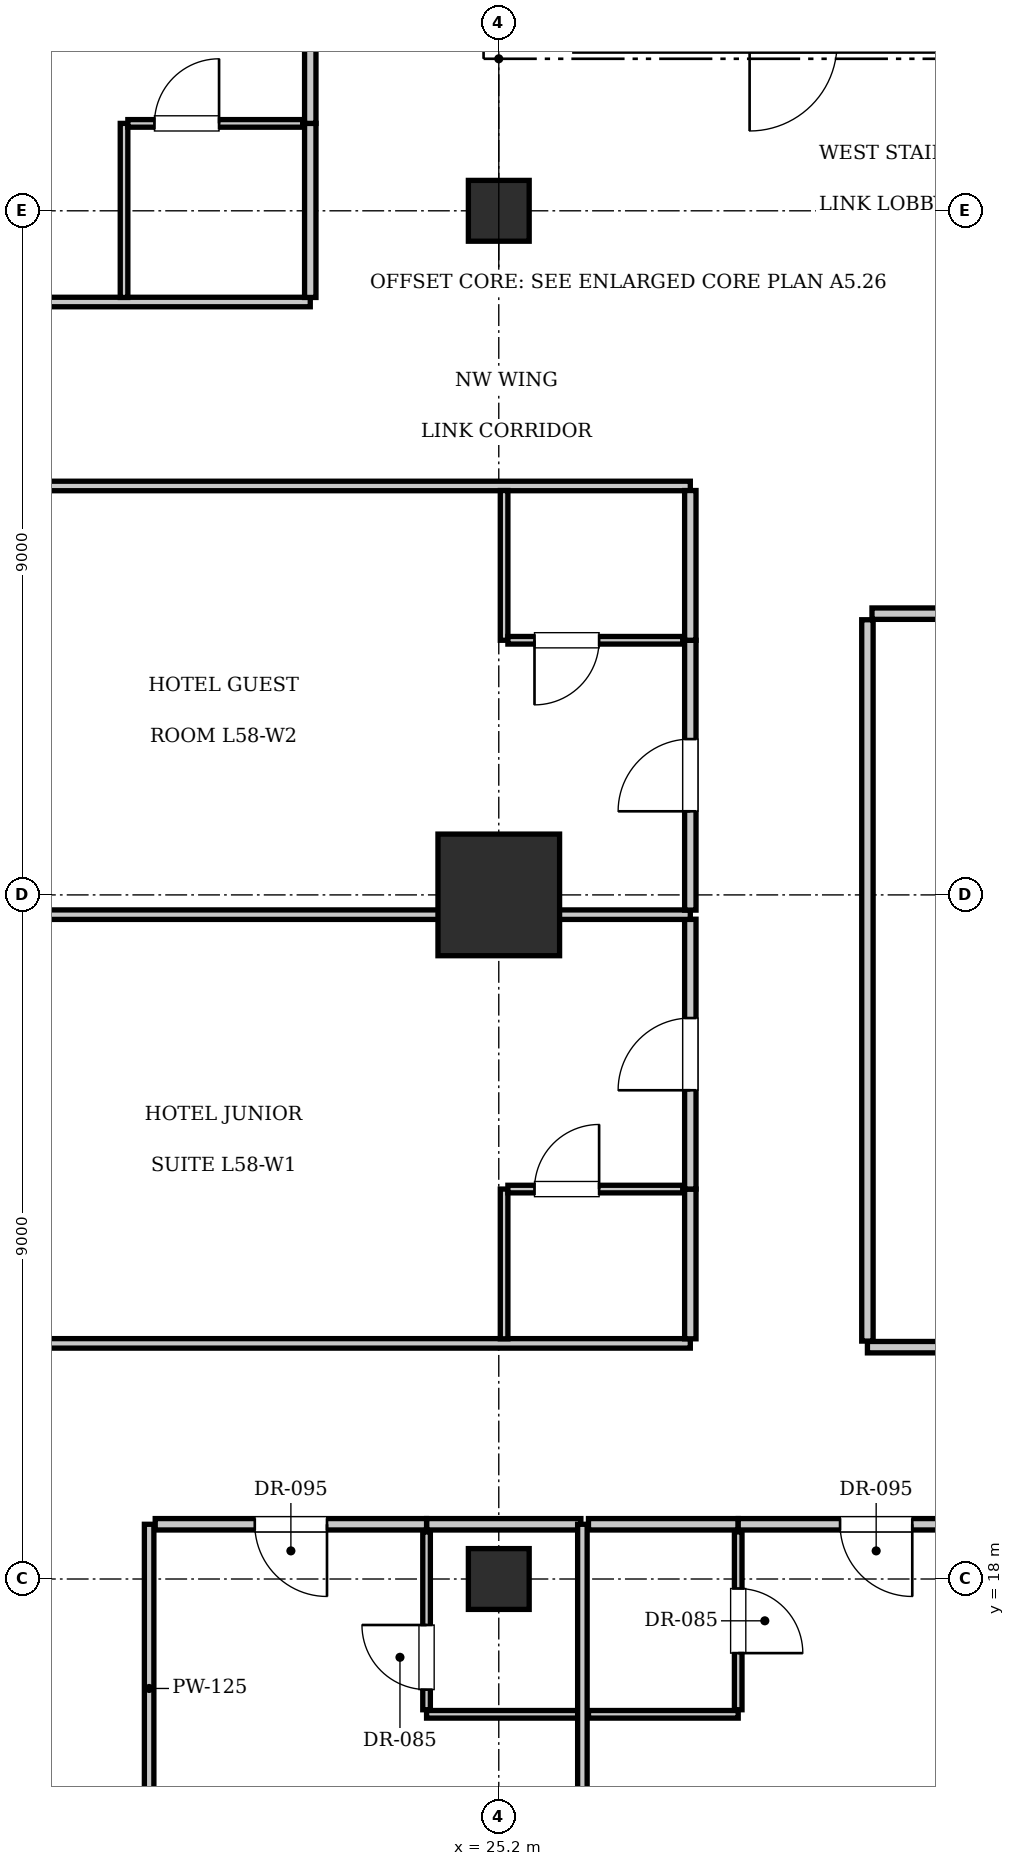
"""IFC4 building model, lengths in metres.
Left out: names, types, materials, properties, quantities, classifications, styles, units other than length and angle.
Written with IfcOpenShell. Run it as: python <this file> out.ifc"""

import sys

from ifc_helpers import new_model, si_unit, direction, frame, frame_2d, origin, origin_2d, place, context, subcontext, project, spatial, rectangle, extrude, element, fill, save


model = new_model("IFC4")
c1 = context("Model", 3, precision=1e-05, world=origin(), true_north=direction((0.0, 1.0)))
c2 = subcontext(c1, "Body", "Model", "MODEL_VIEW")
j1 = project(units=[si_unit("LENGTHUNIT", "METRE"), si_unit("PLANEANGLEUNIT", "RADIAN")], contexts=[c1])
p1 = place(None, origin())
s1 = spatial("IfcSite", under=j1, at=p1, CompositionType="ELEMENT")
p2 = place(p1, origin())
s2 = spatial("IfcBuilding", under=s1, at=p2, CompositionType="ELEMENT")
p3 = place(p2, frame((0.0, 0.0, 239.4)))
s3 = spatial("IfcBuildingStorey", under=s2, at=p3, CompositionType="ELEMENT", Elevation=239.4)
p4 = place(p3, frame((25.2, 27.0, 0.0), z_axis=(0.0, 0.0, 1.0), x_axis=(1.0, 0.0, 0.0)))
e1 = element("IfcColumn", 1, at=p4, inside=s3, PredefinedType="COLUMN", context=c2, shape_type="SweptSolid", body=[
    extrude(rectangle(XDim=1.6, YDim=1.6, at=origin_2d()), origin(), (0.0, 0.0, 1.0), 3.85),
])
for number, where, z_axis, x_axis in (
    (2, (25.2, 36.0, 0.0), (0.0, 0.0, 1.0), (1.0, 0.0, 0.0)),
    (3, (25.2, 18.0, 0.0), (0.0, 0.0, 1.0), (1.0, 0.0, 0.0)),
):
    element("IfcColumn", number, at=place(p3, frame(where, z_axis=z_axis, x_axis=x_axis)), inside=s3, PredefinedType="COLUMN", context=c2, shape_type="SweptSolid", body=[
        extrude(rectangle(XDim=0.8, YDim=0.8, at=origin_2d()), origin(), (0.0, 0.0, 1.0), 3.85),
    ])
p5 = place(p3, frame((30.05, 21.05, 0.0), z_axis=(0.0, 0.0, 1.0), x_axis=(1.0, 0.0, 0.0)))
e4 = element("IfcWall", 4, at=p5, inside=s3, PredefinedType="PARTITIONING", context=c2, shape_type="SweptSolid", body=[
    extrude(rectangle(XDim=15.55, YDim=0.15, at=frame_2d((7.775, 0.0))), origin(), (0.0, 0.0, 1.0), 3.61),
])
p6 = place(p3, frame((30.05, 21.13, 0.0), z_axis=(0.0, 0.0, 1.0), x_axis=(0.0, 1.0, 0.0)))
e5 = element("IfcWall", 5, at=p6, inside=s3, PredefinedType="PARTITIONING", context=c2, shape_type="SweptSolid", body=[
    extrude(rectangle(XDim=9.49, YDim=0.15, at=frame_2d((4.745, 0.0))), origin(), (0.0, 0.0, 1.0), 3.61),
])
p7 = place(p3, frame((30.11, 30.7, 0.0), z_axis=(0.0, 0.0, 1.0), x_axis=(1.0, 0.0, 0.0)))
e6 = element("IfcWall", 6, at=p7, inside=s3, PredefinedType="PARTITIONING", context=c2, shape_type="SweptSolid", body=[
    extrude(rectangle(XDim=5.663, YDim=0.15, at=frame_2d((2.832, 0.0))), origin(), (0.0, 0.0, 1.0), 3.61),
])
p8 = place(p7, frame((2.382, 0.0, 0.0)))
e7 = element("IfcOpeningElement", 7, at=p8, cuts=e6, PredefinedType="OPENING", context=c2, shape_type="SweptSolid", body=[
    extrude(rectangle(XDim=0.9, YDim=2.1, at=frame_2d((0.45, 1.05))), frame((0.0, 0.085, 0.0), z_axis=(0.0, -1.0, 0.0), x_axis=(1.0, 0.0, 0.0)), (0.0, 0.0, 1.0), 0.17),
])
p9 = place(p3, frame((20.6, 14.4, 0.0), z_axis=(0.0, 0.0, 1.0), x_axis=(0.0, 1.0, 0.0)))
e8 = element("IfcWall", 8, at=p9, inside=s3, PredefinedType="PARTITIONING", context=c2, shape_type="SweptSolid", body=[
    extrude(rectangle(XDim=4.32, YDim=0.125, at=frame_2d((2.16, 0.0))), origin(), (0.0, 0.0, 1.0), 3.61),
])
p10 = place(p3, frame((24.25, 18.72, 0.0), z_axis=(0.0, 0.0, 1.0), x_axis=(1.0, 0.0, 0.0)))
e9 = element("IfcWall", 9, at=p10, inside=s3, PredefinedType="PARTITIONING", context=c2, shape_type="SweptSolid", body=[
    extrude(rectangle(XDim=2.03, YDim=0.15, at=frame_2d((1.015, 0.0))), origin(), (0.0, 0.0, 1.0), 3.61),
])
p11 = place(p3, frame((24.25, 16.22, 0.0), z_axis=(0.0, 0.0, 1.0), x_axis=(1.0, 0.0, 0.0)))
e10 = element("IfcWall", 10, at=p11, inside=s3, PredefinedType="PARTITIONING", context=c2, shape_type="SweptSolid", body=[
    extrude(rectangle(XDim=2.01, YDim=0.1, at=frame_2d((1.005, 0.0))), origin(), (0.0, 0.0, 1.0), 3.61),
])
p12 = place(p3, frame((24.25, 16.28, 0.0), z_axis=(0.0, 0.0, 1.0), x_axis=(0.0, 1.0, 0.0)))
e11 = element("IfcWall", 11, at=p12, inside=s3, PredefinedType="PARTITIONING", context=c2, shape_type="SweptSolid", body=[
    extrude(rectangle(XDim=2.34, YDim=0.1, at=frame_2d((1.17, 0.0))), origin(), (0.0, 0.0, 1.0), 3.61),
])
p13 = place(p12, frame((0.265, 0.0, 0.0)))
e12 = element("IfcOpeningElement", 12, at=p13, cuts=e11, PredefinedType="OPENING", context=c2, shape_type="SweptSolid", body=[
    extrude(rectangle(XDim=0.85, YDim=2.1, at=frame_2d((0.425, 1.05))), frame((0.0, 0.06, 0.0), z_axis=(0.0, -1.0, 0.0), x_axis=(1.0, 0.0, 0.0)), (0.0, 0.0, 1.0), 0.12),
])
p14 = place(p3, frame((20.68, 18.72, 0.0), z_axis=(0.0, 0.0, 1.0), x_axis=(1.0, 0.0, 0.0)))
e13 = element("IfcWall", 13, at=p14, inside=s3, PredefinedType="PARTITIONING", context=c2, shape_type="SweptSolid", body=[
    extrude(rectangle(XDim=3.57, YDim=0.15, at=frame_2d((1.785, 0.0))), origin(), (0.0, 0.0, 1.0), 3.61),
])
p15 = place(p14, frame((1.31, 0.0, 0.0)))
e14 = element("IfcOpeningElement", 14, at=p15, cuts=e13, PredefinedType="OPENING", context=c2, shape_type="SweptSolid", body=[
    extrude(rectangle(XDim=0.95, YDim=2.15, at=frame_2d((0.475, 1.075))), frame((0.0, 0.085, 0.0), z_axis=(0.0, -1.0, 0.0), x_axis=(1.0, 0.0, 0.0)), (0.0, 0.0, 1.0), 0.17),
])
p16 = place(p3, frame((26.3, 9.3, 0.0), z_axis=(0.0, 0.0, 1.0), x_axis=(0.0, 1.0, 0.0)))
e15 = element("IfcWall", 15, at=p16, inside=s3, PredefinedType="PARTITIONING", context=c2, shape_type="SweptSolid", body=[
    extrude(rectangle(XDim=9.42, YDim=0.125, at=frame_2d((4.71, 0.0))), origin(), (0.0, 0.0, 1.0), 3.61),
])
p17 = place(p3, frame((26.38, 18.72, 0.0), z_axis=(0.0, 0.0, 1.0), x_axis=(1.0, 0.0, 0.0)))
e16 = element("IfcWall", 16, at=p17, inside=s3, PredefinedType="PARTITIONING", context=c2, shape_type="SweptSolid", body=[
    extrude(rectangle(XDim=1.97, YDim=0.15, at=frame_2d((0.985, 0.0))), origin(), (0.0, 0.0, 1.0), 3.61),
])
p18 = place(p3, frame((26.38, 16.22, 0.0), z_axis=(0.0, 0.0, 1.0), x_axis=(1.0, 0.0, 0.0)))
e17 = element("IfcWall", 17, at=p18, inside=s3, PredefinedType="PARTITIONING", context=c2, shape_type="SweptSolid", body=[
    extrude(rectangle(XDim=1.97, YDim=0.1, at=frame_2d((0.985, 0.0))), origin(), (0.0, 0.0, 1.0), 3.61),
])
p19 = place(p3, frame((28.35, 16.28, 0.0), z_axis=(0.0, 0.0, 1.0), x_axis=(0.0, 1.0, 0.0)))
e18 = element("IfcWall", 18, at=p19, inside=s3, PredefinedType="PARTITIONING", context=c2, shape_type="SweptSolid", body=[
    extrude(rectangle(XDim=2.34, YDim=0.1, at=frame_2d((1.17, 0.0))), origin(), (0.0, 0.0, 1.0), 3.61),
])
p20 = place(p19, frame((0.745, 0.0, 0.0)))
e19 = element("IfcOpeningElement", 19, at=p20, cuts=e18, PredefinedType="OPENING", context=c2, shape_type="SweptSolid", body=[
    extrude(rectangle(XDim=0.85, YDim=2.1, at=frame_2d((0.425, 1.05))), frame((0.0, 0.06, 0.0), z_axis=(0.0, -1.0, 0.0), x_axis=(1.0, 0.0, 0.0)), (0.0, 0.0, 1.0), 0.12),
])
p21 = place(p3, frame((28.35, 18.72, 0.0), z_axis=(0.0, 0.0, 1.0), x_axis=(1.0, 0.0, 0.0)))
e20 = element("IfcWall", 20, at=p21, inside=s3, PredefinedType="PARTITIONING", context=c2, shape_type="SweptSolid", body=[
    extrude(rectangle(XDim=3.63, YDim=0.15, at=frame_2d((1.815, 0.0))), origin(), (0.0, 0.0, 1.0), 3.61),
])
p22 = place(p21, frame((1.34, 0.0, 0.0)))
e21 = element("IfcOpeningElement", 21, at=p22, cuts=e20, PredefinedType="OPENING", context=c2, shape_type="SweptSolid", body=[
    extrude(rectangle(XDim=0.95, YDim=2.15, at=frame_2d((0.475, 1.075))), frame((0.0, 0.085, 0.0), z_axis=(0.0, -1.0, 0.0), x_axis=(1.0, 0.0, 0.0)), (0.0, 0.0, 1.0), 0.17),
])
for number, where, z_axis, x_axis in (
    (22, (15.5, 21.1, 0.0), (0.0, 0.0, 1.0), (1.0, 0.0, 0.0)),
    (23, (15.5, 32.38, 0.0), (0.0, 0.0, 1.0), (1.0, 0.0, 0.0)),
):
    element("IfcWall", number, at=place(p3, frame(where, z_axis=z_axis, x_axis=x_axis)), inside=s3, PredefinedType="PARTITIONING", context=c2, shape_type="SweptSolid", body=[
        extrude(rectangle(XDim=12.22, YDim=0.125, at=frame_2d((6.11, 0.0))), origin(), (0.0, 0.0, 1.0), 3.61),
    ])
p23 = place(p3, frame((27.72, 21.16, 0.0), z_axis=(0.0, 0.0, 1.0), x_axis=(0.0, 1.0, 0.0)))
e24 = element("IfcWall", 24, at=p23, inside=s3, PredefinedType="PARTITIONING", context=c2, shape_type="SweptSolid", body=[
    extrude(rectangle(XDim=1.97, YDim=0.15, at=frame_2d((0.985, 0.0))), origin(), (0.0, 0.0, 1.0), 3.61),
])
p24 = place(p3, frame((27.72, 23.13, 0.0), z_axis=(0.0, 0.0, 1.0), x_axis=(0.0, 1.0, 0.0)))
e25 = element("IfcWall", 25, at=p24, inside=s3, PredefinedType="PARTITIONING", context=c2, shape_type="SweptSolid", body=[
    extrude(rectangle(XDim=3.55, YDim=0.15, at=frame_2d((1.775, 0.0))), origin(), (0.0, 0.0, 1.0), 3.61),
])
p25 = place(p24, frame((1.3, 0.0, 0.0)))
e26 = element("IfcOpeningElement", 26, at=p25, cuts=e25, PredefinedType="OPENING", context=c2, shape_type="SweptSolid", body=[
    extrude(rectangle(XDim=0.95, YDim=2.15, at=frame_2d((0.475, 1.075))), frame((0.0, 0.085, 0.0), z_axis=(0.0, -1.0, 0.0), x_axis=(1.0, 0.0, 0.0)), (0.0, 0.0, 1.0), 0.17),
])
p26 = place(p3, frame((25.27, 21.16, 0.0), z_axis=(0.0, 0.0, 1.0), x_axis=(0.0, 1.0, 0.0)))
e27 = element("IfcWall", 27, at=p26, inside=s3, PredefinedType="PARTITIONING", context=c2, shape_type="SweptSolid", body=[
    extrude(rectangle(XDim=1.97, YDim=0.1, at=frame_2d((0.985, 0.0))), origin(), (0.0, 0.0, 1.0), 3.077),
])
p27 = place(p3, frame((25.32, 23.13, 0.0), z_axis=(0.0, 0.0, 1.0), x_axis=(1.0, 0.0, 0.0)))
e28 = element("IfcWall", 28, at=p27, inside=s3, PredefinedType="PARTITIONING", context=c2, shape_type="SweptSolid", body=[
    extrude(rectangle(XDim=2.3, YDim=0.1, at=frame_2d((1.15, 0.0))), origin(), (0.0, 0.0, 1.0), 3.61),
])
p28 = place(p27, frame((0.35, 0.0, 0.0)))
e29 = element("IfcOpeningElement", 29, at=p28, cuts=e28, PredefinedType="OPENING", context=c2, shape_type="SweptSolid", body=[
    extrude(rectangle(XDim=0.85, YDim=2.1, at=frame_2d((0.425, 1.05))), frame((0.0, 0.06, 0.0), z_axis=(0.0, -1.0, 0.0), x_axis=(1.0, 0.0, 0.0)), (0.0, 0.0, 1.0), 0.12),
])
p29 = place(p3, frame((15.5, 26.74, 0.0), z_axis=(0.0, 0.0, 1.0), x_axis=(1.0, 0.0, 0.0)))
e30 = element("IfcWall", 30, at=p29, inside=s3, PredefinedType="PARTITIONING", context=c2, shape_type="SweptSolid", body=[
    extrude(rectangle(XDim=12.22, YDim=0.125, at=frame_2d((6.11, 0.0))), origin(), (0.0, 0.0, 1.0), 2.41),
])
p30 = place(p3, frame((27.72, 26.8, 0.0), z_axis=(0.0, 0.0, 1.0), x_axis=(0.0, 1.0, 0.0)))
e31 = element("IfcWall", 31, at=p30, inside=s3, PredefinedType="PARTITIONING", context=c2, shape_type="SweptSolid", body=[
    extrude(rectangle(XDim=3.55, YDim=0.15, at=frame_2d((1.775, 0.0))), origin(), (0.0, 0.0, 1.0), 3.61),
])
p31 = place(p30, frame((1.3, 0.0, 0.0)))
e32 = element("IfcOpeningElement", 32, at=p31, cuts=e31, PredefinedType="OPENING", context=c2, shape_type="SweptSolid", body=[
    extrude(rectangle(XDim=0.95, YDim=2.15, at=frame_2d((0.475, 1.075))), frame((0.0, 0.085, 0.0), z_axis=(0.0, -1.0, 0.0), x_axis=(1.0, 0.0, 0.0)), (0.0, 0.0, 1.0), 0.17),
])
p32 = place(p3, frame((27.72, 30.35, 0.0), z_axis=(0.0, 0.0, 1.0), x_axis=(0.0, 1.0, 0.0)))
e33 = element("IfcWall", 33, at=p32, inside=s3, PredefinedType="PARTITIONING", context=c2, shape_type="SweptSolid", body=[
    extrude(rectangle(XDim=1.97, YDim=0.15, at=frame_2d((0.985, 0.0))), origin(), (0.0, 0.0, 1.0), 3.61),
])
p33 = place(p3, frame((25.27, 30.35, 0.0), z_axis=(0.0, 0.0, 1.0), x_axis=(0.0, 1.0, 0.0)))
e34 = element("IfcWall", 34, at=p33, inside=s3, PredefinedType="PARTITIONING", context=c2, shape_type="SweptSolid", body=[
    extrude(rectangle(XDim=1.97, YDim=0.1, at=frame_2d((0.985, 0.0))), origin(), (0.0, 0.0, 1.0), 3.077),
])
p34 = place(p3, frame((25.32, 30.35, 0.0), z_axis=(0.0, 0.0, 1.0), x_axis=(1.0, 0.0, 0.0)))
e35 = element("IfcWall", 35, at=p34, inside=s3, PredefinedType="PARTITIONING", context=c2, shape_type="SweptSolid", body=[
    extrude(rectangle(XDim=2.3, YDim=0.1, at=frame_2d((1.15, 0.0))), origin(), (0.0, 0.0, 1.0), 3.61),
])
p35 = place(p34, frame((0.35, 0.0, 0.0)))
e36 = element("IfcOpeningElement", 36, at=p35, cuts=e35, PredefinedType="OPENING", context=c2, shape_type="SweptSolid", body=[
    extrude(rectangle(XDim=0.85, YDim=2.1, at=frame_2d((0.425, 1.05))), frame((0.0, 0.06, 0.0), z_axis=(0.0, -1.0, 0.0), x_axis=(1.0, 0.0, 0.0)), (0.0, 0.0, 1.0), 0.12),
])
p36 = place(p3, frame((15.5, 34.8, 0.0), z_axis=(0.0, 0.0, 1.0), x_axis=(1.0, 0.0, 0.0)))
e37 = element("IfcWall", 37, at=p36, inside=s3, PredefinedType="PARTITIONING", context=c2, shape_type="SweptSolid", body=[
    extrude(rectangle(XDim=7.22, YDim=0.125, at=frame_2d((3.61, 0.0))), origin(), (0.0, 0.0, 1.0), 3.61),
])
p37 = place(p3, frame((22.72, 34.86, 0.0), z_axis=(0.0, 0.0, 1.0), x_axis=(0.0, 1.0, 0.0)))
e38 = element("IfcWall", 38, at=p37, inside=s3, PredefinedType="PARTITIONING", context=c2, shape_type="SweptSolid", body=[
    extrude(rectangle(XDim=2.29, YDim=0.15, at=frame_2d((1.145, 0.0))), origin(), (0.0, 0.0, 1.0), 3.61),
])
p38 = place(p3, frame((22.72, 37.15, 0.0), z_axis=(0.0, 0.0, 1.0), x_axis=(0.0, 1.0, 0.0)))
e39 = element("IfcWall", 39, at=p38, inside=s3, PredefinedType="PARTITIONING", context=c2, shape_type="SweptSolid", body=[
    extrude(rectangle(XDim=4.559, YDim=0.15, at=frame_2d((2.279, 0.0))), origin(), (0.0, 0.0, 1.0), 3.61),
])
p39 = place(p38, frame((1.804, 0.0, 0.0)))
e40 = element("IfcOpeningElement", 40, at=p39, cuts=e39, PredefinedType="OPENING", context=c2, shape_type="SweptSolid", body=[
    extrude(rectangle(XDim=0.95, YDim=2.15, at=frame_2d((0.475, 1.075))), frame((0.0, 0.085, 0.0), z_axis=(0.0, -1.0, 0.0), x_axis=(1.0, 0.0, 0.0)), (0.0, 0.0, 1.0), 0.17),
])
p40 = place(p3, frame((20.27, 34.86, 0.0), z_axis=(0.0, 0.0, 1.0), x_axis=(0.0, 1.0, 0.0)))
e41 = element("IfcWall", 41, at=p40, inside=s3, PredefinedType="PARTITIONING", context=c2, shape_type="SweptSolid", body=[
    extrude(rectangle(XDim=2.29, YDim=0.1, at=frame_2d((1.145, 0.0))), origin(), (0.0, 0.0, 1.0), 3.61),
])
p41 = place(p3, frame((20.32, 37.15, 0.0), z_axis=(0.0, 0.0, 1.0), x_axis=(1.0, 0.0, 0.0)))
e42 = element("IfcWall", 42, at=p41, inside=s3, PredefinedType="PARTITIONING", context=c2, shape_type="SweptSolid", body=[
    extrude(rectangle(XDim=2.3, YDim=0.1, at=frame_2d((1.15, 0.0))), origin(), (0.0, 0.0, 1.0), 3.61),
])
p42 = place(p41, frame((0.35, 0.0, 0.0)))
e43 = element("IfcOpeningElement", 43, at=p42, cuts=e42, PredefinedType="OPENING", context=c2, shape_type="SweptSolid", body=[
    extrude(rectangle(XDim=0.85, YDim=2.1, at=frame_2d((0.425, 1.05))), frame((0.0, 0.06, 0.0), z_axis=(0.0, -1.0, 0.0), x_axis=(1.0, 0.0, 0.0)), (0.0, 0.0, 1.0), 0.12),
])
p43 = place(p13, origin())
e44 = element("IfcDoor", 44, at=p43, inside=s3, OperationType="SINGLE_SWING_RIGHT", PredefinedType="DOOR", context=c2, shape_type="SweptSolid", body=[
    extrude(rectangle(XDim=0.85, YDim=2.1, at=frame_2d((0.425, 1.05))), frame((0.0, 0.025, 0.0), z_axis=(0.0, -1.0, 0.0), x_axis=(1.0, 0.0, 0.0)), (0.0, 0.0, 1.0), 0.05),
])
fill(e12, e44)
p44 = place(p15, frame((0.95, 0.0, 0.0), z_axis=(0.0, 0.0, 1.0), x_axis=(-1.0, 0.0, 0.0)))
e45 = element("IfcDoor", 45, at=p44, inside=s3, OperationType="SINGLE_SWING_LEFT", PredefinedType="DOOR", context=c2, shape_type="SweptSolid", body=[
    extrude(rectangle(XDim=0.95, YDim=2.15, at=frame_2d((0.475, 1.075))), frame((0.0, 0.025, 0.0), z_axis=(0.0, -1.0, 0.0), x_axis=(1.0, 0.0, 0.0)), (0.0, 0.0, 1.0), 0.05),
])
fill(e14, e45)
p45 = place(p20, frame((0.85, 0.0, 0.0), z_axis=(0.0, 0.0, 1.0), x_axis=(-1.0, 0.0, 0.0)))
e46 = element("IfcDoor", 46, at=p45, inside=s3, OperationType="SINGLE_SWING_RIGHT", PredefinedType="DOOR", context=c2, shape_type="SweptSolid", body=[
    extrude(rectangle(XDim=0.85, YDim=2.1, at=frame_2d((0.425, 1.05))), frame((0.0, 0.025, 0.0), z_axis=(0.0, -1.0, 0.0), x_axis=(1.0, 0.0, 0.0)), (0.0, 0.0, 1.0), 0.05),
])
fill(e19, e46)
p46 = place(p22, frame((0.95, 0.0, 0.0), z_axis=(0.0, 0.0, 1.0), x_axis=(-1.0, 0.0, 0.0)))
e47 = element("IfcDoor", 47, at=p46, inside=s3, OperationType="SINGLE_SWING_LEFT", PredefinedType="DOOR", context=c2, shape_type="SweptSolid", body=[
    extrude(rectangle(XDim=0.95, YDim=2.15, at=frame_2d((0.475, 1.075))), frame((0.0, 0.025, 0.0), z_axis=(0.0, -1.0, 0.0), x_axis=(1.0, 0.0, 0.0)), (0.0, 0.0, 1.0), 0.05),
])
fill(e21, e47)
p47 = place(p28, origin())
e48 = element("IfcDoor", 48, at=p47, inside=s3, OperationType="SINGLE_SWING_RIGHT", PredefinedType="DOOR", context=c2, shape_type="SweptSolid", body=[
    extrude(rectangle(XDim=0.85, YDim=2.1, at=frame_2d((0.425, 1.05))), frame((0.0, 0.025, 0.0), z_axis=(0.0, -1.0, 0.0), x_axis=(1.0, 0.0, 0.0)), (0.0, 0.0, 1.0), 0.05),
])
fill(e29, e48)
p48 = place(p25, origin())
e49 = element("IfcDoor", 49, at=p48, inside=s3, OperationType="SINGLE_SWING_LEFT", PredefinedType="DOOR", context=c2, shape_type="SweptSolid", body=[
    extrude(rectangle(XDim=0.95, YDim=2.15, at=frame_2d((0.475, 1.075))), frame((0.0, 0.025, 0.0), z_axis=(0.0, -1.0, 0.0), x_axis=(1.0, 0.0, 0.0)), (0.0, 0.0, 1.0), 0.05),
])
fill(e26, e49)
p49 = place(p35, frame((0.85, 0.0, 0.0), z_axis=(0.0, 0.0, 1.0), x_axis=(-1.0, 0.0, 0.0)))
e50 = element("IfcDoor", 50, at=p49, inside=s3, OperationType="SINGLE_SWING_RIGHT", PredefinedType="DOOR", context=c2, shape_type="SweptSolid", body=[
    extrude(rectangle(XDim=0.85, YDim=2.1, at=frame_2d((0.425, 1.05))), frame((0.0, 0.025, 0.0), z_axis=(0.0, -1.0, 0.0), x_axis=(1.0, 0.0, 0.0)), (0.0, 0.0, 1.0), 0.05),
])
fill(e36, e50)
p50 = place(p31, origin())
e51 = element("IfcDoor", 51, at=p50, inside=s3, OperationType="SINGLE_SWING_LEFT", PredefinedType="DOOR", context=c2, shape_type="SweptSolid", body=[
    extrude(rectangle(XDim=0.95, YDim=2.15, at=frame_2d((0.475, 1.075))), frame((0.0, 0.025, 0.0), z_axis=(0.0, -1.0, 0.0), x_axis=(1.0, 0.0, 0.0)), (0.0, 0.0, 1.0), 0.05),
])
fill(e32, e51)
p51 = place(p42, origin())
e52 = element("IfcDoor", 52, at=p51, inside=s3, OperationType="SINGLE_SWING_RIGHT", PredefinedType="DOOR", context=c2, shape_type="SweptSolid", body=[
    extrude(rectangle(XDim=0.85, YDim=2.1, at=frame_2d((0.425, 1.05))), frame((0.0, 0.025, 0.0), z_axis=(0.0, -1.0, 0.0), x_axis=(1.0, 0.0, 0.0)), (0.0, 0.0, 1.0), 0.05),
])
fill(e43, e52)
save(model, sys.argv[1])
